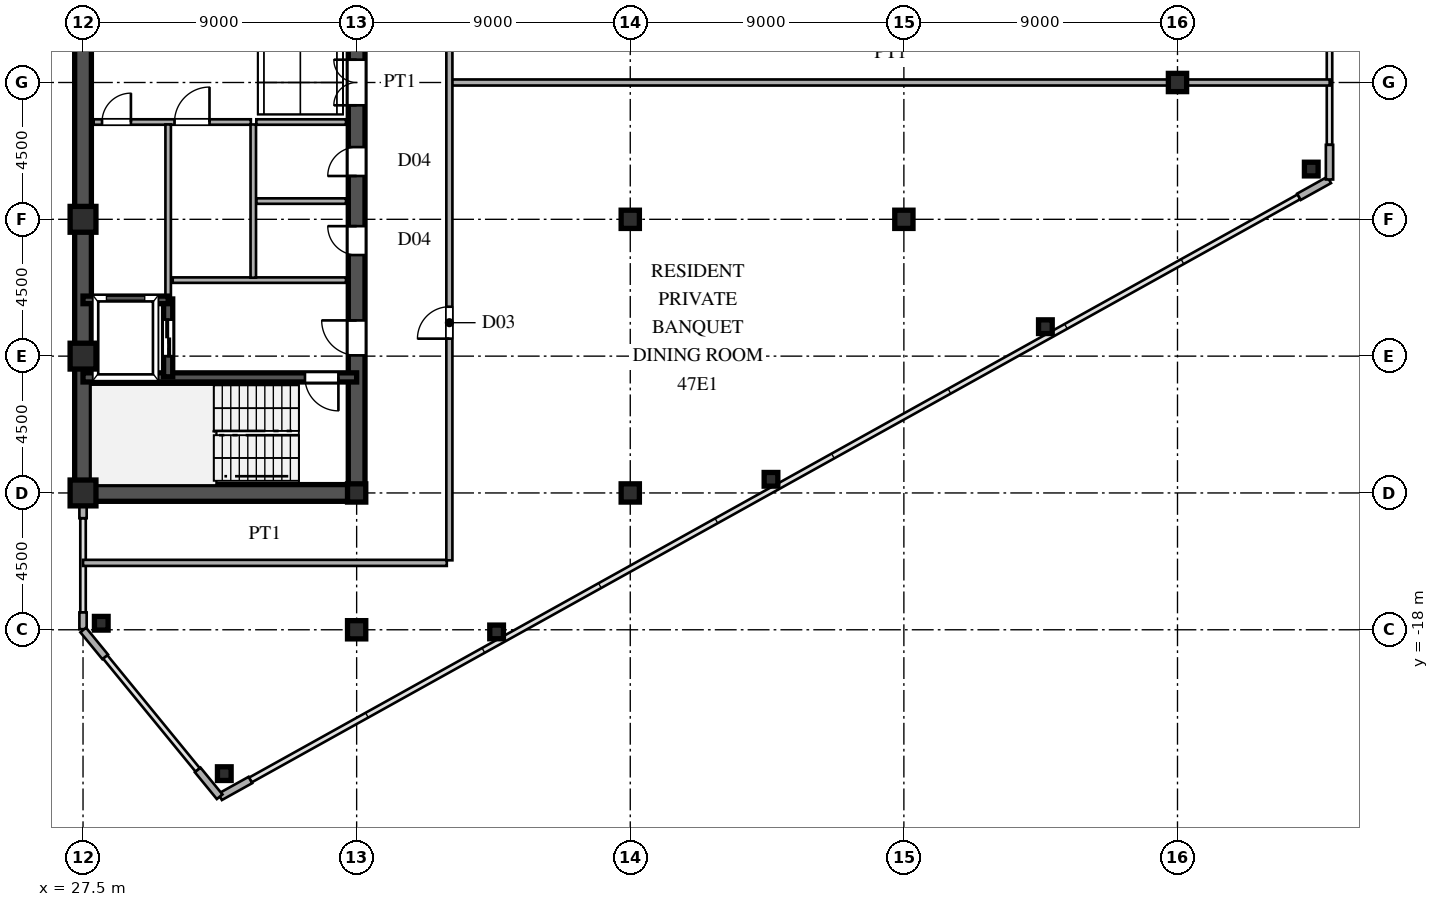
"""IFC4 building model, lengths in metres.
Left out: names, types, materials, properties, quantities, classifications, styles, units other than length and angle.
Written with IfcOpenShell. Run it as: python <this file> out.ifc"""

import sys

from ifc_helpers import new_model, si_unit, direction, frame, frame_2d, origin, origin_2d, place, context, subcontext, project, spatial, rectangle, hollow_rectangle, i_section, extrude, source, transform, mapped, element, fill, save


model = new_model("IFC4")
c1 = context("Model", 3, precision=1e-05, world=origin(), true_north=direction((0.0, 1.0)))
c2 = subcontext(c1, "Body", "Model", "MODEL_VIEW")
j1 = project(units=[si_unit("LENGTHUNIT", "METRE"), si_unit("PLANEANGLEUNIT", "RADIAN")], contexts=[c1])
p1 = place(None, origin())
s1 = spatial("IfcSite", under=j1, at=p1, CompositionType="ELEMENT")
p2 = place(p1, origin())
s2 = spatial("IfcBuilding", under=s1, at=p2, CompositionType="ELEMENT")
p3 = place(p2, frame((0.0, 0.0, 177.9)))
s3 = spatial("IfcBuildingStorey", under=s2, at=p3, CompositionType="ELEMENT", Elevation=177.9)
m1 = source(origin(), c2, "Body", "SweptSolid", [
    extrude(hollow_rectangle(XDim=0.85, YDim=0.85, WallThickness=0.036, at=origin_2d()), origin(), (0.0, 0.0, 1.0), 3.6),
])
for number, where, z_axis, x_axis in (
    (1, (27.5, -13.5, 0.0), (0.0, 0.0, 1.0), (1.0, 0.0, 0.0)),
    (2, (27.5, -9.0, 0.0), (0.0, 0.0, 1.0), (1.0, 0.0, 0.0)),
    (3, (27.5, -4.5, 0.0), (0.0, 0.0, 1.0), (1.0, 0.0, 0.0)),
):
    element("IfcColumn", number, at=place(p3, frame(where, z_axis=z_axis, x_axis=x_axis)), inside=s3, PredefinedType="COLUMN", context=c2, shape_type="MappedRepresentation", body=[
        mapped(m1, transform((0.0, 0.0, 0.0), scale=1.0)),
    ])
m2 = source(origin(), c2, "Body", "SweptSolid", [
    extrude(i_section(OverallWidth=0.6, OverallDepth=0.6, WebThickness=0.025, FlangeThickness=0.04, at=origin_2d()), origin(), (0.0, 0.0, 1.0), 3.6),
])
for number, where, z_axis, x_axis in (
    (4, (36.5, -18.0, 0.0), (0.0, 0.0, 1.0), (1.0, 0.0, 0.0)),
    (5, (36.5, -13.5, 0.0), (0.0, 0.0, 1.0), (1.0, 0.0, 0.0)),
    (6, (45.5, -13.5, 0.0), (0.0, 0.0, 1.0), (1.0, 0.0, 0.0)),
    (7, (45.5, -4.5, 0.0), (0.0, 0.0, 1.0), (1.0, 0.0, 0.0)),
    (8, (54.5, -4.5, 0.0), (0.0, 0.0, 1.0), (1.0, 0.0, 0.0)),
    (9, (63.5, 0.0, 0.0), (0.0, 0.0, 1.0), (1.0, 0.0, 0.0)),
):
    element("IfcColumn", number, at=place(p3, frame(where, z_axis=z_axis, x_axis=x_axis)), inside=s3, PredefinedType="COLUMN", context=c2, shape_type="MappedRepresentation", body=[
        mapped(m2, transform((0.0, 0.0, 0.0), scale=1.0)),
    ])
m3 = source(origin(), c2, "Body", "SweptSolid", [
    extrude(hollow_rectangle(XDim=0.45, YDim=0.45, WallThickness=0.018, at=origin_2d()), origin(), (0.0, 0.0, 1.0), 3.6),
])
for number, where, z_axis, x_axis in (
    (10, (32.147, -22.732, 0.0), (0.0, 0.0, 1.0), (1.0, 0.0, 0.0)),
    (11, (67.9, -2.847, 0.0), (0.0, 0.0, 1.0), (1.0, 0.0, 0.0)),
    (12, (28.1, -17.786, 0.0), (0.0, 0.0, 1.0), (1.0, 0.0, 0.0)),
    (13, (41.104, -18.071, 0.0), (0.0, 0.0, 1.0), (1.0, 0.0, 0.0)),
    (14, (50.129, -13.051, 0.0), (0.0, 0.0, 1.0), (1.0, 0.0, 0.0)),
    (15, (59.155, -8.031, 0.0), (0.0, 0.0, 1.0), (1.0, 0.0, 0.0)),
):
    element("IfcColumn", number, at=place(p3, frame(where, z_axis=z_axis, x_axis=x_axis)), inside=s3, PredefinedType="COLUMN", context=c2, shape_type="MappedRepresentation", body=[
        mapped(m3, transform((0.0, 0.0, 0.0), scale=1.0)),
    ])
for number, where, z_axis, x_axis in (
    (16, (32.009, -23.495, 0.0), (0.0, 0.0, 1.0), (0.874, 0.486, 0.0)),
    (17, (67.495, -3.759, 0.0), (0.0, 0.0, 1.0), (0.874, 0.486, 0.0)),
    (18, (68.5, -3.19, 0.0), (0.0, 0.0, 1.0), (0.0, 1.0, 0.0)),
):
    element("IfcWall", number, at=place(p3, frame(where, z_axis=z_axis, x_axis=x_axis)), inside=s3, PredefinedType="SOLIDWALL", context=c2, shape_type="SweptSolid", body=[
        extrude(rectangle(XDim=1.14, YDim=0.24, at=frame_2d((0.57, 0.0))), origin(), (0.0, 0.0, 1.0), 3.38),
    ])
p4 = place(p3, frame((27.5, -17.98, 0.0), z_axis=(0.0, 0.0, 1.0), x_axis=(0.0, 1.0, 0.0)))
e19 = element("IfcWall", 19, at=p4, inside=s3, PredefinedType="SOLIDWALL", context=c2, shape_type="SweptSolid", body=[
    extrude(rectangle(XDim=0.55, YDim=0.24, at=frame_2d((0.275, 0.0))), origin(), (0.0, 0.0, 1.0), 3.38),
])
p5 = place(p3, frame((27.5, -14.33, 0.0), z_axis=(0.0, 0.0, 1.0), x_axis=(0.0, 1.0, 0.0)))
e20 = element("IfcWall", 20, at=p5, inside=s3, PredefinedType="SOLIDWALL", context=c2, shape_type="SweptSolid", body=[
    extrude(rectangle(XDim=0.55, YDim=0.24, at=frame_2d((0.275, 0.0))), origin(), (0.0, 0.0, 1.0), 2.88),
])
for number, where, z_axis, x_axis in (
    (21, (27.506, -18.008, 0.0), (0.0, 0.0, 1.0), (0.633, -0.774, 0.0)),
    (22, (31.272, -22.61, 0.0), (0.0, 0.0, 1.0), (0.633, -0.774, 0.0)),
):
    element("IfcWall", number, at=place(p3, frame(where, z_axis=z_axis, x_axis=x_axis)), inside=s3, PredefinedType="SOLIDWALL", context=c2, shape_type="SweptSolid", body=[
        extrude(rectangle(XDim=1.14, YDim=0.24, at=frame_2d((0.57, 0.0))), origin(), (0.0, 0.0, 1.0), 3.38),
    ])
p6 = place(p3, frame((27.5, -13.5, 0.0), z_axis=(0.0, 0.0, 1.0), x_axis=(0.0, 1.0, 0.0)))
e23 = element("IfcWall", 23, at=p6, inside=s3, PredefinedType="SHEAR", context=c2, shape_type="SweptSolid", body=[
    extrude(rectangle(XDim=12.2, YDim=0.55, at=frame_2d((6.1, 0.0))), origin(), (0.0, 0.0, 1.0), 3.38),
])
p7 = place(p3, frame((27.5, -1.3, 0.0), z_axis=(0.0, 0.0, 1.0), x_axis=(0.0, 1.0, 0.0)))
e24 = element("IfcWall", 24, at=p7, inside=s3, PredefinedType="SHEAR", context=c2, shape_type="SweptSolid", body=[
    extrude(rectangle(XDim=2.6, YDim=0.55, at=frame_2d((1.3, 0.0))), origin(), (0.0, 0.0, 1.0), 3.38),
])
p8 = place(p3, frame((27.5, -13.5, 0.0), z_axis=(0.0, 0.0, 1.0), x_axis=(1.0, 0.0, 0.0)))
e25 = element("IfcWall", 25, at=p8, inside=s3, PredefinedType="SHEAR", context=c2, shape_type="SweptSolid", body=[
    extrude(rectangle(XDim=9.0, YDim=0.55, at=frame_2d((4.5, 0.0))), origin(), (0.0, 0.0, 1.0), 3.38),
])
p9 = place(p3, frame((36.5, -13.65, 0.0), z_axis=(0.0, 0.0, 1.0), x_axis=(0.0, 1.0, 0.0)))
e26 = element("IfcWall", 26, at=p9, inside=s3, PredefinedType="SHEAR", context=c2, shape_type="SweptSolid", body=[
    extrude(rectangle(XDim=7.15, YDim=0.55, at=frame_2d((3.575, 0.0))), origin(), (0.0, 0.0, 1.0), 3.38),
])
p10 = place(p9, frame((4.675, 0.0, 0.0)))
e27 = element("IfcOpeningElement", 27, at=p10, cuts=e26, PredefinedType="OPENING", context=c2, shape_type="SweptSolid", body=[
    extrude(rectangle(XDim=1.15, YDim=2.2, at=frame_2d((0.575, 1.1))), frame((0.0, 0.285, 0.0), z_axis=(0.0, -1.0, 0.0), x_axis=(1.0, 0.0, 0.0)), (0.0, 0.0, 1.0), 0.57),
])
p11 = place(p3, frame((36.5, -1.3, 0.0), z_axis=(0.0, 0.0, 1.0), x_axis=(0.0, 1.0, 0.0)))
e28 = element("IfcWall", 28, at=p11, inside=s3, PredefinedType="SHEAR", context=c2, shape_type="SweptSolid", body=[
    extrude(rectangle(XDim=2.6, YDim=0.55, at=frame_2d((1.3, 0.0))), origin(), (0.0, 0.0, 1.0), 3.38),
])
p12 = place(p11, frame((0.55, 0.0, 0.0)))
e29 = element("IfcOpeningElement", 29, at=p12, cuts=e28, PredefinedType="OPENING", context=c2, shape_type="SweptSolid", body=[
    extrude(rectangle(XDim=1.5, YDim=2.3, at=frame_2d((0.75, 1.15))), frame((0.0, 0.285, 0.0), z_axis=(0.0, -1.0, 0.0), x_axis=(1.0, 0.0, 0.0)), (0.0, 0.0, 1.0), 0.57),
])
p13 = place(p3, frame((36.5, -6.5, 0.0), z_axis=(0.0, 0.0, 1.0), x_axis=(0.0, 1.0, 0.0)))
e30 = element("IfcWall", 30, at=p13, inside=s3, PredefinedType="SHEAR", context=c2, shape_type="SweptSolid", body=[
    extrude(rectangle(XDim=2.6, YDim=0.55, at=frame_2d((1.3, 0.0))), origin(), (0.0, 0.0, 1.0), 3.38),
])
p14 = place(p13, frame((0.825, 0.0, 0.0)))
e31 = element("IfcOpeningElement", 31, at=p14, cuts=e30, PredefinedType="OPENING", context=c2, shape_type="SweptSolid", body=[
    extrude(rectangle(XDim=0.95, YDim=2.15, at=frame_2d((0.475, 1.075))), frame((0.0, 0.285, 0.0), z_axis=(0.0, -1.0, 0.0), x_axis=(1.0, 0.0, 0.0)), (0.0, 0.0, 1.0), 0.57),
])
p15 = place(p3, frame((36.5, -3.9, 0.0), z_axis=(0.0, 0.0, 1.0), x_axis=(0.0, 1.0, 0.0)))
e32 = element("IfcWall", 32, at=p15, inside=s3, PredefinedType="SHEAR", context=c2, shape_type="SweptSolid", body=[
    extrude(rectangle(XDim=2.6, YDim=0.55, at=frame_2d((1.3, 0.0))), origin(), (0.0, 0.0, 1.0), 3.38),
])
p16 = place(p15, frame((0.825, 0.0, 0.0)))
e33 = element("IfcOpeningElement", 33, at=p16, cuts=e32, PredefinedType="OPENING", context=c2, shape_type="SweptSolid", body=[
    extrude(rectangle(XDim=0.95, YDim=2.15, at=frame_2d((0.475, 1.075))), frame((0.0, 0.285, 0.0), z_axis=(0.0, -1.0, 0.0), x_axis=(1.0, 0.0, 0.0)), (0.0, 0.0, 1.0), 0.57),
])
p17 = place(p3, frame((27.5, -9.7, 0.0), z_axis=(0.0, 0.0, 1.0), x_axis=(1.0, 0.0, 0.0)))
e34 = element("IfcWall", 34, at=p17, inside=s3, PredefinedType="SHEAR", context=c2, shape_type="SweptSolid", body=[
    extrude(rectangle(XDim=9.0, YDim=0.3, at=frame_2d((4.5, 0.0))), origin(), (0.0, 0.0, 1.0), 3.38),
])
p18 = place(p17, frame((7.3, 0.0, 0.0)))
e35 = element("IfcOpeningElement", 35, at=p18, cuts=e34, PredefinedType="OPENING", context=c2, shape_type="SweptSolid", body=[
    extrude(rectangle(XDim=1.1, YDim=2.2, at=frame_2d((0.55, 1.1))), frame((0.0, 0.16, 0.0), z_axis=(0.0, -1.0, 0.0), x_axis=(1.0, 0.0, 0.0)), (0.0, 0.0, 1.0), 0.32),
])
p19 = place(p3, frame((27.5, -7.15, 0.0), z_axis=(0.0, 0.0, 1.0), x_axis=(1.0, 0.0, 0.0)))
e36 = element("IfcWall", 36, at=p19, inside=s3, PredefinedType="SHEAR", context=c2, shape_type="SweptSolid", body=[
    extrude(rectangle(XDim=2.8, YDim=0.25, at=frame_2d((1.4, 0.0))), origin(), (0.0, 0.0, 1.0), 3.38),
])
p20 = place(p3, frame((30.3, -9.68, 0.0), z_axis=(0.0, 0.0, 1.0), x_axis=(0.0, 1.0, 0.0)))
e37 = element("IfcWall", 37, at=p20, inside=s3, PredefinedType="SHEAR", context=c2, shape_type="SweptSolid", body=[
    extrude(rectangle(XDim=2.56, YDim=0.3, at=frame_2d((1.28, 0.0))), origin(), (0.0, 0.0, 1.0), 3.38),
])
p21 = place(p20, frame((0.68, 0.0, 0.0)))
e38 = element("IfcOpeningElement", 38, at=p21, cuts=e37, PredefinedType="OPENING", context=c2, shape_type="SweptSolid", body=[
    extrude(rectangle(XDim=1.2, YDim=2.25, at=frame_2d((0.6, 1.125))), frame((0.0, 0.16, 0.0), z_axis=(0.0, -1.0, 0.0), x_axis=(1.0, 0.0, 0.0)), (0.0, 0.0, 1.0), 0.32),
])
p22 = place(p3, frame((30.45, -6.5, 0.0), z_axis=(0.0, 0.0, 1.0), x_axis=(1.0, 0.0, 0.0)))
e39 = element("IfcWall", 39, at=p22, inside=s3, PredefinedType="PARTITIONING", context=c2, shape_type="SweptSolid", body=[
    extrude(rectangle(XDim=5.7, YDim=0.18, at=frame_2d((2.85, 0.0))), origin(), (0.0, 0.0, 1.0), 3.38),
])
p23 = place(p3, frame((33.1, -6.42, 0.0), z_axis=(0.0, 0.0, 1.0), x_axis=(0.0, 1.0, 0.0)))
e40 = element("IfcWall", 40, at=p23, inside=s3, PredefinedType="PARTITIONING", context=c2, shape_type="SweptSolid", body=[
    extrude(rectangle(XDim=5.04, YDim=0.18, at=frame_2d((2.52, 0.0))), origin(), (0.0, 0.0, 1.0), 3.38),
])
p24 = place(p3, frame((27.85, -1.3, 0.0), z_axis=(0.0, 0.0, 1.0), x_axis=(1.0, 0.0, 0.0)))
e41 = element("IfcWall", 41, at=p24, inside=s3, PredefinedType="PARTITIONING", context=c2, shape_type="SweptSolid", body=[
    extrude(rectangle(XDim=2.45, YDim=0.18, at=frame_2d((1.225, 0.0))), origin(), (0.0, 0.0, 1.0), 3.38),
])
p25 = place(p24, frame((0.275, 0.0, 0.0)))
e42 = element("IfcOpeningElement", 42, at=p25, cuts=e41, PredefinedType="OPENING", context=c2, shape_type="SweptSolid", body=[
    extrude(rectangle(XDim=0.95, YDim=2.15, at=frame_2d((0.475, 1.075))), frame((0.0, 0.1, 0.0), z_axis=(0.0, -1.0, 0.0), x_axis=(1.0, 0.0, 0.0)), (0.0, 0.0, 1.0), 0.2),
])
p26 = place(p3, frame((30.3, -1.3, 0.0), z_axis=(0.0, 0.0, 1.0), x_axis=(1.0, 0.0, 0.0)))
e43 = element("IfcWall", 43, at=p26, inside=s3, PredefinedType="PARTITIONING", context=c2, shape_type="SweptSolid", body=[
    extrude(rectangle(XDim=2.72, YDim=0.18, at=frame_2d((1.36, 0.0))), origin(), (0.0, 0.0, 1.0), 3.38),
])
p27 = place(p26, frame((0.21, 0.0, 0.0)))
e44 = element("IfcOpeningElement", 44, at=p27, cuts=e43, PredefinedType="OPENING", context=c2, shape_type="SweptSolid", body=[
    extrude(rectangle(XDim=1.15, YDim=2.2, at=frame_2d((0.575, 1.1))), frame((0.0, 0.1, 0.0), z_axis=(0.0, -1.0, 0.0), x_axis=(1.0, 0.0, 0.0)), (0.0, 0.0, 1.0), 0.2),
])
p28 = place(p3, frame((30.3, -7.12, 0.0), z_axis=(0.0, 0.0, 1.0), x_axis=(0.0, 1.0, 0.0)))
e45 = element("IfcWall", 45, at=p28, inside=s3, PredefinedType="PARTITIONING", context=c2, shape_type="SweptSolid", body=[
    extrude(rectangle(XDim=5.74, YDim=0.18, at=frame_2d((2.87, 0.0))), origin(), (0.0, 0.0, 1.0), 3.38),
])
for number, where, z_axis, x_axis in (
    (46, (33.2, -1.3, 0.0), (0.0, 0.0, 1.0), (1.0, 0.0, 0.0)),
    (47, (33.2, -3.9, 0.0), (0.0, 0.0, 1.0), (1.0, 0.0, 0.0)),
):
    element("IfcWall", number, at=place(p3, frame(where, z_axis=z_axis, x_axis=x_axis)), inside=s3, PredefinedType="PARTITIONING", context=c2, shape_type="SweptSolid", body=[
        extrude(rectangle(XDim=2.95, YDim=0.18, at=frame_2d((1.475, 0.0))), origin(), (0.0, 0.0, 1.0), 3.38),
    ])
p29 = place(p3, frame((27.5, -15.8, 0.0), z_axis=(0.0, 0.0, 1.0), x_axis=(1.0, 0.0, 0.0)))
e48 = element("IfcWall", 48, at=p29, inside=s3, PredefinedType="PARTITIONING", context=c2, shape_type="SweptSolid", body=[
    extrude(rectangle(XDim=11.965, YDim=0.2, at=frame_2d((5.982, 0.0))), origin(), (0.0, 0.0, 1.0), 3.38),
])
p30 = place(p3, frame((39.63, 0.0, 0.0), z_axis=(0.0, 0.0, 1.0), x_axis=(1.0, 0.0, 0.0)))
e49 = element("IfcWall", 49, at=p30, inside=s3, PredefinedType="PARTITIONING", context=c2, shape_type="SweptSolid", body=[
    extrude(rectangle(XDim=28.875, YDim=0.2, at=frame_2d((14.438, 0.0))), origin(), (0.0, 0.0, 1.0), 3.38),
])
p31 = place(p3, frame((39.55, -15.715, 0.0), z_axis=(0.0, 0.0, 1.0), x_axis=(0.0, 1.0, 0.0)))
e50 = element("IfcWall", 50, at=p31, inside=s3, PredefinedType="PARTITIONING", context=c2, shape_type="SweptSolid", body=[
    extrude(rectangle(XDim=31.43, YDim=0.2, at=frame_2d((15.715, 0.0))), origin(), (0.0, 0.0, 1.0), 3.38),
])
p32 = place(p31, frame((7.29, 0.0, 0.0)))
e51 = element("IfcOpeningElement", 51, at=p32, cuts=e50, PredefinedType="OPENING", context=c2, shape_type="SweptSolid", body=[
    extrude(rectangle(XDim=1.05, YDim=2.25, at=frame_2d((0.525, 1.125))), frame((0.0, 0.11, 0.0), z_axis=(0.0, -1.0, 0.0), x_axis=(1.0, 0.0, 0.0)), (0.0, 0.0, 1.0), 0.22),
])
p33 = place(p31, frame((23.09, 0.0, 0.0)))
e52 = element("IfcOpeningElement", 52, at=p33, cuts=e50, PredefinedType="OPENING", context=c2, shape_type="SweptSolid", body=[
    extrude(rectangle(XDim=1.05, YDim=2.25, at=frame_2d((0.525, 1.125))), frame((0.0, 0.11, 0.0), z_axis=(0.0, -1.0, 0.0), x_axis=(1.0, 0.0, 0.0)), (0.0, 0.0, 1.0), 0.22),
])
m4 = source(origin(), c2, "Body", "SweptSolid", [
    extrude(rectangle(XDim=1.15, YDim=2.2, at=frame_2d((0.575, 1.1))), frame((0.0, 0.025, 0.0), z_axis=(0.0, -1.0, 0.0), x_axis=(1.0, 0.0, 0.0)), (0.0, 0.0, 1.0), 0.05),
])
p34 = place(p10, origin())
e53 = element("IfcDoor", 53, at=p34, inside=s3, OperationType="SINGLE_SWING_RIGHT", PredefinedType="DOOR", context=c2, shape_type="MappedRepresentation", body=[
    mapped(m4, transform((0.0, 0.0, 0.0), scale=1.0)),
])
fill(e27, e53)
m5 = source(origin(), c2, "Body", "SweptSolid", [
    extrude(rectangle(XDim=1.5, YDim=2.3, at=frame_2d((0.75, 1.15))), frame((0.0, 0.025, 0.0), z_axis=(0.0, -1.0, 0.0), x_axis=(1.0, 0.0, 0.0)), (0.0, 0.0, 1.0), 0.05),
])
p35 = place(p12, origin())
e54 = element("IfcDoor", 54, at=p35, inside=s3, OperationType="DOUBLE_SWING_LEFT", PredefinedType="DOOR", context=c2, shape_type="MappedRepresentation", body=[
    mapped(m5, transform((0.0, 0.0, 0.0), scale=1.0)),
])
fill(e29, e54)
m6 = source(origin(), c2, "Body", "SweptSolid", [
    extrude(rectangle(XDim=0.95, YDim=2.15, at=frame_2d((0.475, 1.075))), frame((0.0, 0.025, 0.0), z_axis=(0.0, -1.0, 0.0), x_axis=(1.0, 0.0, 0.0)), (0.0, 0.0, 1.0), 0.05),
])
p36 = place(p14, origin())
e55 = element("IfcDoor", 55, at=p36, inside=s3, OperationType="SINGLE_SWING_RIGHT", PredefinedType="DOOR", context=c2, shape_type="MappedRepresentation", body=[
    mapped(m6, transform((0.0, 0.0, 0.0), scale=1.0)),
])
fill(e31, e55)
p37 = place(p16, origin())
e56 = element("IfcDoor", 56, at=p37, inside=s3, OperationType="SINGLE_SWING_LEFT", PredefinedType="DOOR", context=c2, shape_type="MappedRepresentation", body=[
    mapped(m6, transform((0.0, 0.0, 0.0), scale=1.0)),
])
fill(e33, e56)
m7 = source(origin(), c2, "Body", "SweptSolid", [
    extrude(rectangle(XDim=1.1, YDim=2.2, at=frame_2d((0.55, 1.1))), frame((0.0, 0.025, 0.0), z_axis=(0.0, -1.0, 0.0), x_axis=(1.0, 0.0, 0.0)), (0.0, 0.0, 1.0), 0.05),
])
p38 = place(p18, frame((1.1, 0.0, 0.0), z_axis=(0.0, 0.0, 1.0), x_axis=(-1.0, 0.0, 0.0)))
e57 = element("IfcDoor", 57, at=p38, inside=s3, OperationType="SINGLE_SWING_RIGHT", PredefinedType="DOOR", context=c2, shape_type="MappedRepresentation", body=[
    mapped(m7, transform((0.0, 0.0, 0.0), scale=1.0)),
])
fill(e35, e57)
m8 = source(origin(), c2, "Body", "SweptSolid", [
    extrude(rectangle(XDim=1.2, YDim=2.25, at=frame_2d((0.6, 1.125))), frame((0.0, 0.025, 0.0), z_axis=(0.0, -1.0, 0.0), x_axis=(1.0, 0.0, 0.0)), (0.0, 0.0, 1.0), 0.05),
])
p39 = place(p21, origin())
e58 = element("IfcDoor", 58, at=p39, inside=s3, OperationType="DOUBLE_DOOR_SLIDING", PredefinedType="DOOR", context=c2, shape_type="MappedRepresentation", body=[
    mapped(m8, transform((0.0, 0.0, 0.0), scale=1.0)),
])
fill(e38, e58)
p40 = place(p25, origin())
e59 = element("IfcDoor", 59, at=p40, inside=s3, OperationType="SINGLE_SWING_RIGHT", PredefinedType="DOOR", context=c2, shape_type="MappedRepresentation", body=[
    mapped(m6, transform((0.0, 0.0, 0.0), scale=1.0)),
])
fill(e42, e59)
p41 = place(p27, origin())
e60 = element("IfcDoor", 60, at=p41, inside=s3, OperationType="SINGLE_SWING_RIGHT", PredefinedType="DOOR", context=c2, shape_type="MappedRepresentation", body=[
    mapped(m4, transform((0.0, 0.0, 0.0), scale=1.0)),
])
fill(e44, e60)
m9 = source(origin(), c2, "Body", "SweptSolid", [
    extrude(rectangle(XDim=1.05, YDim=2.25, at=frame_2d((0.525, 1.125))), frame((0.0, 0.025, 0.0), z_axis=(0.0, -1.0, 0.0), x_axis=(1.0, 0.0, 0.0)), (0.0, 0.0, 1.0), 0.05),
])
p42 = place(p32, origin())
e61 = element("IfcDoor", 61, at=p42, inside=s3, OperationType="SINGLE_SWING_LEFT", PredefinedType="DOOR", context=c2, shape_type="MappedRepresentation", body=[
    mapped(m9, transform((0.0, 0.0, 0.0), scale=1.0)),
])
fill(e51, e61)
save(model, sys.argv[1])
